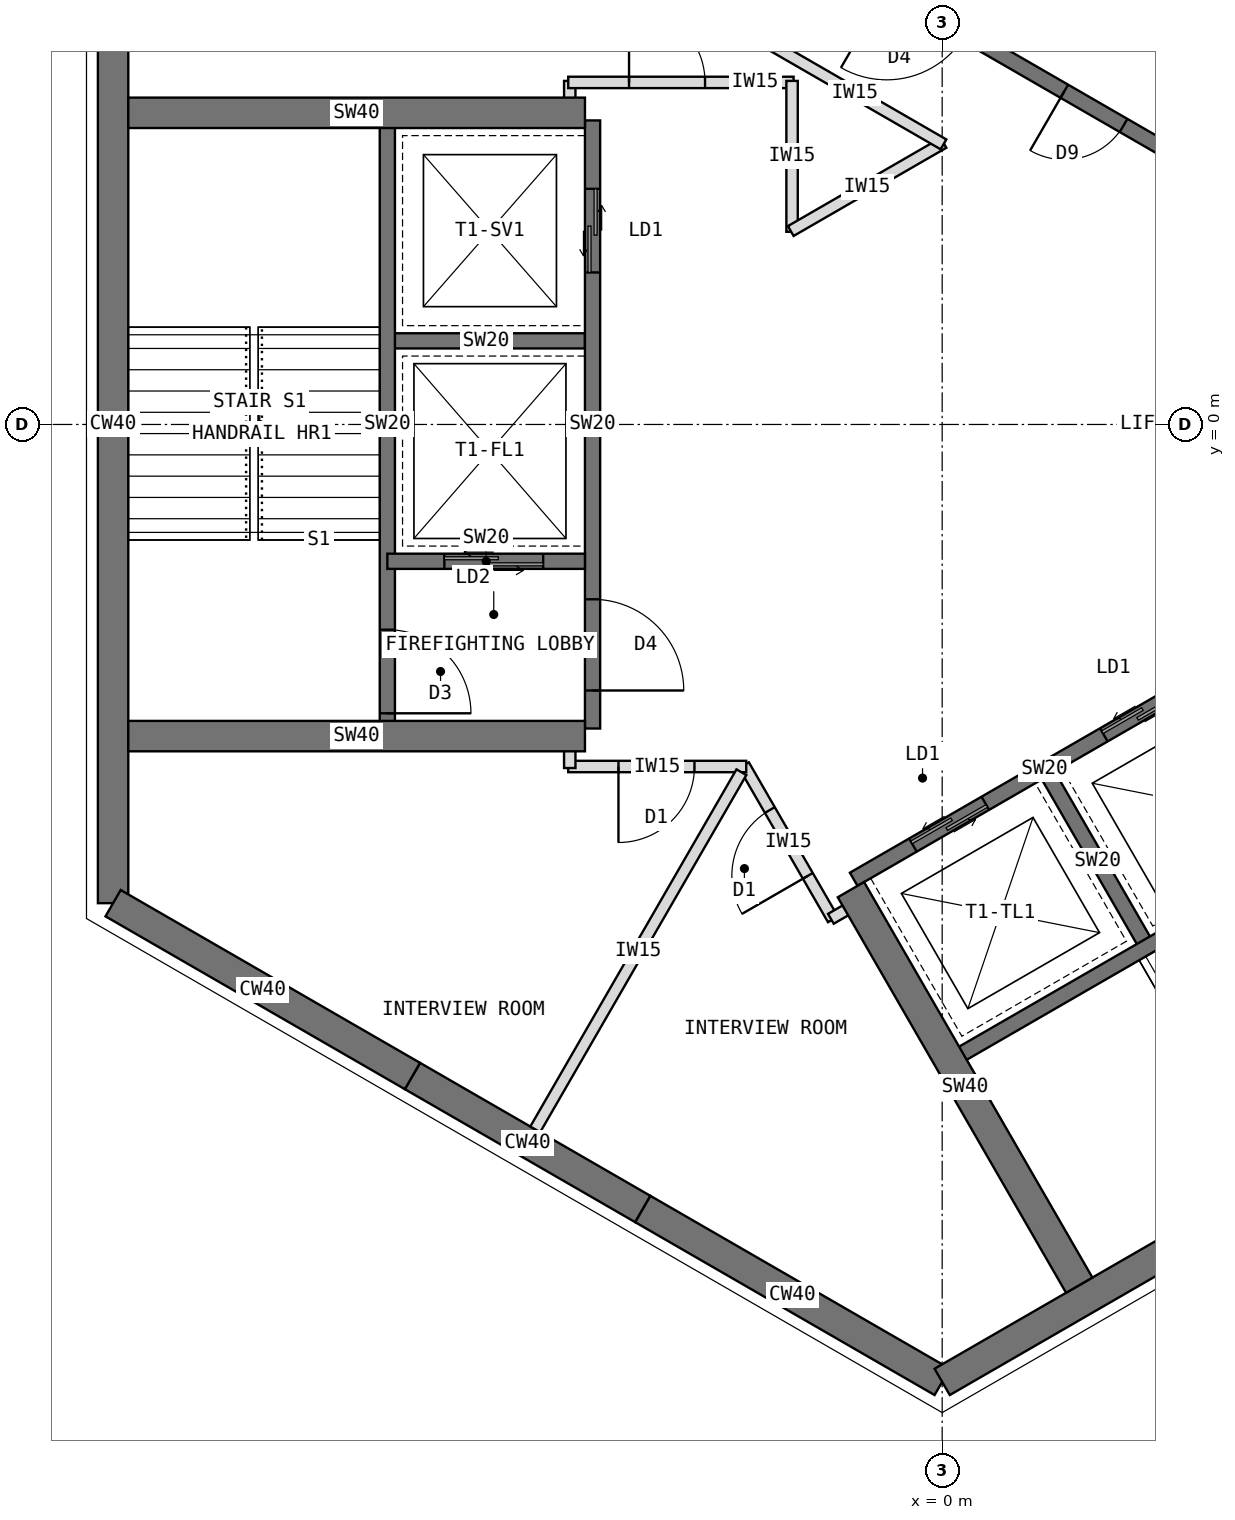
"""IFC4 building model, lengths in metres.
Left out: names, types, materials, properties, quantities, classifications, styles, units other than length and angle.
Written with IfcOpenShell. Run it as: python <this file> out.ifc"""

import sys

from ifc_helpers import new_model, si_unit, direction, frame, frame_2d, origin, place, context, subcontext, project, spatial, rectangle, extrude, element, fill, save


model = new_model("IFC4")
c1 = context("Model", 3, precision=1e-05, world=origin(), true_north=direction((0.0, 1.0)))
c2 = subcontext(c1, "Body", "Model", "MODEL_VIEW")
j1 = project(units=[si_unit("LENGTHUNIT", "METRE"), si_unit("PLANEANGLEUNIT", "RADIAN")], contexts=[c1])
p1 = place(None, origin())
s1 = spatial("IfcSite", under=j1, at=p1, CompositionType="ELEMENT")
p2 = place(p1, origin())
s2 = spatial("IfcBuilding", under=s1, at=p2, CompositionType="ELEMENT")
p3 = place(p2, frame((0.0, 0.0, 287.5)))
s3 = spatial("IfcBuildingStorey", under=s2, at=p3, CompositionType="ELEMENT", Elevation=287.5)
p4 = place(p3, frame((-10.908, 6.298, 0.0), z_axis=(0.0, 0.0, 1.0), x_axis=(0.0, -1.0, 0.0)))
e1 = element("IfcWall", 1, at=p4, inside=s3, PredefinedType="SHEAR", context=c2, shape_type="SweptSolid", body=[
    extrude(rectangle(XDim=12.596, YDim=0.4, at=frame_2d((6.298, 0.0))), origin(), (0.0, 0.0, 1.0), 4.0),
])
p5 = place(p3, frame((-10.908, -6.298, 0.0), z_axis=(0.0, 0.0, 1.0), x_axis=(0.866034513004, -0.499984222037, 0.0)))
e2 = element("IfcWall", 2, at=p5, inside=s3, PredefinedType="SHEAR", context=c2, shape_type="SweptSolid", body=[
    extrude(rectangle(XDim=4.548, YDim=0.4, at=frame_2d((2.274, 0.0))), origin(), (0.0, 0.0, 1.0), 4.0),
])
p6 = place(p3, frame((-6.97, -8.572, 0.0), z_axis=(0.0, 0.0, 1.0), x_axis=(0.866019471182, -0.500010275428, 0.0)))
e3 = element("IfcWall", 3, at=p6, inside=s3, PredefinedType="SHEAR", context=c2, shape_type="SweptSolid", body=[
    extrude(rectangle(XDim=3.5, YDim=0.4, at=frame_2d((1.75, 0.0))), origin(), (0.0, 0.0, 1.0), 4.0),
])
p7 = place(p3, frame((-3.939, -10.322, 0.0), z_axis=(0.0, 0.0, 1.0), x_axis=(0.866011268655, -0.500024481964, 0.0)))
e4 = element("IfcWall", 4, at=p7, inside=s3, PredefinedType="SHEAR", context=c2, shape_type="SweptSolid", body=[
    extrude(rectangle(XDim=4.548, YDim=0.4, at=frame_2d((2.274, 0.0))), origin(), (0.0, 0.0, 1.0), 4.0),
])
p8 = place(p3, frame((0.0, -12.596, 0.0), z_axis=(0.0, 0.0, 1.0), x_axis=(0.866021940709, 0.500005998175, 0.0)))
e5 = element("IfcWall", 5, at=p8, inside=s3, PredefinedType="SHEAR", context=c2, shape_type="SweptSolid", body=[
    extrude(rectangle(XDim=12.596, YDim=0.4, at=frame_2d((6.298, 0.0))), origin(), (0.0, 0.0, 1.0), 4.0),
])
p9 = place(p3, frame((5.764, 1.984, 0.0), z_axis=(0.0, 0.0, 1.0), x_axis=(-0.866026010844, 0.49999894854, 0.0)))
e6 = element("IfcWall", 6, at=p9, inside=s3, PredefinedType="SHEAR", context=c2, shape_type="SweptSolid", body=[
    extrude(rectangle(XDim=8.0, YDim=0.2, at=frame_2d((4.0, 0.0))), origin(), (0.0, 0.0, 1.0), 4.0),
])
p10 = place(p9, frame((6.3, 0.0, 0.0)))
e7 = element("IfcOpeningElement", 7, at=p10, cuts=e6, PredefinedType="OPENING", context=c2, shape_type="SweptSolid", body=[
    extrude(rectangle(XDim=1.2, YDim=2.1, at=frame_2d((0.6, 1.05))), frame((0.0, 0.11, 0.0), z_axis=(0.0, -1.0, 0.0), x_axis=(1.0, 0.0, 0.0)), (0.0, 0.0, 1.0), 0.22),
])
p11 = place(p9, frame((1.0, 0.0, 0.0)))
e8 = element("IfcOpeningElement", 8, at=p11, cuts=e6, PredefinedType="OPENING", context=c2, shape_type="SweptSolid", body=[
    extrude(rectangle(XDim=0.9, YDim=2.1, at=frame_2d((0.45, 1.05))), frame((0.0, 0.11, 0.0), z_axis=(0.0, -1.0, 0.0), x_axis=(1.0, 0.0, 0.0)), (0.0, 0.0, 1.0), 0.22),
])
p12 = place(p9, frame((3.9, 0.0, 0.0)))
e9 = element("IfcOpeningElement", 9, at=p12, cuts=e6, PredefinedType="OPENING", context=c2, shape_type="SweptSolid", body=[
    extrude(rectangle(XDim=0.9, YDim=2.1, at=frame_2d((0.45, 1.05))), frame((0.0, 0.11, 0.0), z_axis=(0.0, -1.0, 0.0), x_axis=(1.0, 0.0, 0.0)), (0.0, 0.0, 1.0), 0.22),
])
p13 = place(p3, frame((7.114, 4.322, 0.0), z_axis=(0.0, 0.0, 1.0), x_axis=(-0.866026010844, 0.49999894854, 0.0)))
e10 = element("IfcWall", 10, at=p13, inside=s3, PredefinedType="SHEAR", context=c2, shape_type="SweptSolid", body=[
    extrude(rectangle(XDim=8.0, YDim=0.2, at=frame_2d((4.0, 0.0))), origin(), (0.0, 0.0, 1.0), 4.0),
])
p14 = place(p13, frame((6.8, 0.0, 0.0)))
e11 = element("IfcOpeningElement", 11, at=p14, cuts=e10, PredefinedType="OPENING", context=c2, shape_type="SweptSolid", body=[
    extrude(rectangle(XDim=0.9, YDim=2.1, at=frame_2d((0.45, 1.05))), frame((0.0, 0.11, 0.0), z_axis=(0.0, -1.0, 0.0), x_axis=(1.0, 0.0, 0.0)), (0.0, 0.0, 1.0), 0.22),
])
p15 = place(p3, frame((-4.6, 4.0, 0.0), z_axis=(0.0, 0.0, 1.0), x_axis=(0.0, -1.0, 0.0)))
e12 = element("IfcWall", 12, at=p15, inside=s3, PredefinedType="SHEAR", context=c2, shape_type="SweptSolid", body=[
    extrude(rectangle(XDim=8.0, YDim=0.2, at=frame_2d((4.0, 0.0))), origin(), (0.0, 0.0, 1.0), 4.0),
])
p16 = place(p15, frame((6.3, 0.0, 0.0)))
e13 = element("IfcOpeningElement", 13, at=p16, cuts=e12, PredefinedType="OPENING", context=c2, shape_type="SweptSolid", body=[
    extrude(rectangle(XDim=1.2, YDim=2.1, at=frame_2d((0.6, 1.05))), frame((0.0, 0.11, 0.0), z_axis=(0.0, -1.0, 0.0), x_axis=(1.0, 0.0, 0.0)), (0.0, 0.0, 1.0), 0.22),
])
p17 = place(p15, frame((0.9, 0.0, 0.0)))
e14 = element("IfcOpeningElement", 14, at=p17, cuts=e12, PredefinedType="OPENING", context=c2, shape_type="SweptSolid", body=[
    extrude(rectangle(XDim=1.1, YDim=2.2, at=frame_2d((0.55, 1.1))), frame((0.0, 0.11, 0.0), z_axis=(0.0, -1.0, 0.0), x_axis=(1.0, 0.0, 0.0)), (0.0, 0.0, 1.0), 0.22),
])
p18 = place(p3, frame((-4.7, 1.1, 0.0), z_axis=(0.0, 0.0, 1.0), x_axis=(-1.0, 0.0, 0.0)))
e15 = element("IfcWall", 15, at=p18, inside=s3, PredefinedType="SHEAR", context=c2, shape_type="SweptSolid", body=[
    extrude(rectangle(XDim=2.6, YDim=0.2, at=frame_2d((1.3, 0.0))), origin(), (0.0, 0.0, 1.0), 4.0),
])
p19 = place(p3, frame((-4.7, -1.8, 0.0), z_axis=(0.0, 0.0, 1.0), x_axis=(-1.0, 0.0, 0.0)))
e16 = element("IfcWall", 16, at=p19, inside=s3, PredefinedType="SHEAR", context=c2, shape_type="SweptSolid", body=[
    extrude(rectangle(XDim=2.6, YDim=0.2, at=frame_2d((1.3, 0.0))), origin(), (0.0, 0.0, 1.0), 4.0),
])
p20 = place(p19, frame((0.55, 0.0, 0.0)))
e17 = element("IfcOpeningElement", 17, at=p20, cuts=e16, PredefinedType="OPENING", context=c2, shape_type="SweptSolid", body=[
    extrude(rectangle(XDim=1.3, YDim=2.2, at=frame_2d((0.65, 1.1))), frame((0.0, 0.11, 0.0), z_axis=(0.0, -1.0, 0.0), x_axis=(1.0, 0.0, 0.0)), (0.0, 0.0, 1.0), 0.22),
])
p21 = place(p3, frame((-7.3, 4.0, 0.0), z_axis=(0.0, 0.0, 1.0), x_axis=(0.0, -1.0, 0.0)))
e18 = element("IfcWall", 18, at=p21, inside=s3, PredefinedType="SHEAR", context=c2, shape_type="SweptSolid", body=[
    extrude(rectangle(XDim=8.0, YDim=0.2, at=frame_2d((4.0, 0.0))), origin(), (0.0, 0.0, 1.0), 4.0),
])
p22 = place(p21, frame((6.7, 0.0, 0.0)))
e19 = element("IfcOpeningElement", 19, at=p22, cuts=e18, PredefinedType="OPENING", context=c2, shape_type="SweptSolid", body=[
    extrude(rectangle(XDim=1.1, YDim=2.1, at=frame_2d((0.55, 1.05))), frame((0.0, 0.11, 0.0), z_axis=(0.0, -1.0, 0.0), x_axis=(1.0, 0.0, 0.0)), (0.0, 0.0, 1.0), 0.22),
])
for number, where, z_axis, x_axis in (
    (20, (-4.7, -4.1, 0.0), (0.0, 0.0, 1.0), (-1.0, 0.0, 0.0)),
    (21, (-4.7, 4.1, 0.0), (0.0, 0.0, 1.0), (-1.0, 0.0, 0.0)),
):
    element("IfcWall", number, at=place(p3, frame(where, z_axis=z_axis, x_axis=x_axis)), inside=s3, PredefinedType="SHEAR", context=c2, shape_type="SweptSolid", body=[
        extrude(rectangle(XDim=6.008, YDim=0.4, at=frame_2d((3.004, 0.0))), origin(), (0.0, 0.0, 1.0), 4.0),
    ])
p23 = place(p3, frame((-1.164, -5.984, 0.0), z_axis=(0.0, 0.0, 1.0), x_axis=(0.866026010844, 0.49999894854, 0.0)))
e22 = element("IfcWall", 22, at=p23, inside=s3, PredefinedType="SHEAR", context=c2, shape_type="SweptSolid", body=[
    extrude(rectangle(XDim=8.0, YDim=0.2, at=frame_2d((4.0, 0.0))), origin(), (0.0, 0.0, 1.0), 4.0),
])
p24 = place(p23, frame((6.3, 0.0, 0.0)))
e23 = element("IfcOpeningElement", 23, at=p24, cuts=e22, PredefinedType="OPENING", context=c2, shape_type="SweptSolid", body=[
    extrude(rectangle(XDim=1.2, YDim=2.1, at=frame_2d((0.6, 1.05))), frame((0.0, 0.11, 0.0), z_axis=(0.0, -1.0, 0.0), x_axis=(1.0, 0.0, 0.0)), (0.0, 0.0, 1.0), 0.22),
])
p25 = place(p23, frame((0.9, 0.0, 0.0)))
e24 = element("IfcOpeningElement", 24, at=p25, cuts=e22, PredefinedType="OPENING", context=c2, shape_type="SweptSolid", body=[
    extrude(rectangle(XDim=1.1, YDim=2.2, at=frame_2d((0.55, 1.1))), frame((0.0, 0.11, 0.0), z_axis=(0.0, -1.0, 0.0), x_axis=(1.0, 0.0, 0.0)), (0.0, 0.0, 1.0), 0.22),
])
p26 = place(p23, frame((3.8, 0.0, 0.0)))
e25 = element("IfcOpeningElement", 25, at=p26, cuts=e22, PredefinedType="OPENING", context=c2, shape_type="SweptSolid", body=[
    extrude(rectangle(XDim=1.1, YDim=2.2, at=frame_2d((0.55, 1.1))), frame((0.0, 0.11, 0.0), z_axis=(0.0, -1.0, 0.0), x_axis=(1.0, 0.0, 0.0)), (0.0, 0.0, 1.0), 0.22),
])
p27 = place(p3, frame((1.397, -4.62, 0.0), z_axis=(0.0, 0.0, 1.0), x_axis=(0.499936506574, -0.866062058628, 0.0)))
e26 = element("IfcWall", 26, at=p27, inside=s3, PredefinedType="SHEAR", context=c2, shape_type="SweptSolid", body=[
    extrude(rectangle(XDim=2.6, YDim=0.2, at=frame_2d((1.3, 0.0))), origin(), (0.0, 0.0, 1.0), 4.0),
])
p28 = place(p3, frame((0.186, -8.322, 0.0), z_axis=(0.0, 0.0, 1.0), x_axis=(0.866026010844, 0.49999894854, 0.0)))
e27 = element("IfcWall", 27, at=p28, inside=s3, PredefinedType="SHEAR", context=c2, shape_type="SweptSolid", body=[
    extrude(rectangle(XDim=8.0, YDim=0.2, at=frame_2d((4.0, 0.0))), origin(), (0.0, 0.0, 1.0), 4.0),
])
p29 = place(p28, frame((6.7, 0.0, 0.0)))
e28 = element("IfcOpeningElement", 28, at=p29, cuts=e27, PredefinedType="OPENING", context=c2, shape_type="SweptSolid", body=[
    extrude(rectangle(XDim=1.1, YDim=2.1, at=frame_2d((0.55, 1.05))), frame((0.0, 0.11, 0.0), z_axis=(0.0, -1.0, 0.0), x_axis=(1.0, 0.0, 0.0)), (0.0, 0.0, 1.0), 0.22),
])
p30 = place(p3, frame((-1.201, -6.12, 0.0), z_axis=(0.0, 0.0, 1.0), x_axis=(0.499997979876, -0.866026570101, 0.0)))
e29 = element("IfcWall", 29, at=p30, inside=s3, PredefinedType="SHEAR", context=c2, shape_type="SweptSolid", body=[
    extrude(rectangle(XDim=6.008, YDim=0.4, at=frame_2d((3.004, 0.0))), origin(), (0.0, 0.0, 1.0), 4.0),
])
p31 = place(p3, frame((-1.437, -6.511, 0.0), z_axis=(0.0, 0.0, 1.0), x_axis=(-0.500074377092, 0.865982457891, 0.0)))
e30 = element("IfcWall", 30, at=p31, inside=s3, PredefinedType="PARTITIONING", context=c2, shape_type="SweptSolid", body=[
    extrude(rectangle(XDim=2.342, YDim=0.15, at=frame_2d((1.171, 0.0))), origin(), (0.0, 0.0, 1.0), 3.7),
])
p32 = place(p31, frame((0.661, 0.0, 0.0)))
e31 = element("IfcOpeningElement", 31, at=p32, cuts=e30, PredefinedType="OPENING", context=c2, shape_type="SweptSolid", body=[
    extrude(rectangle(XDim=1.0, YDim=2.1, at=frame_2d((0.5, 1.05))), frame((0.0, 0.085, 0.0), z_axis=(0.0, -1.0, 0.0), x_axis=(1.0, 0.0, 0.0)), (0.0, 0.0, 1.0), 0.17),
])
p33 = place(p3, frame((-2.578, -4.5, 0.0), z_axis=(0.0, 0.0, 1.0), x_axis=(-1.0, 0.0, 0.0)))
e32 = element("IfcWall", 32, at=p33, inside=s3, PredefinedType="PARTITIONING", context=c2, shape_type="SweptSolid", body=[
    extrude(rectangle(XDim=2.342, YDim=0.15, at=frame_2d((1.171, 0.0))), origin(), (0.0, 0.0, 1.0), 3.7),
])
p34 = place(p33, frame((0.681, 0.0, 0.0)))
e33 = element("IfcOpeningElement", 33, at=p34, cuts=e32, PredefinedType="OPENING", context=c2, shape_type="SweptSolid", body=[
    extrude(rectangle(XDim=1.0, YDim=2.1, at=frame_2d((0.5, 1.05))), frame((0.0, 0.085, 0.0), z_axis=(0.0, -1.0, 0.0), x_axis=(1.0, 0.0, 0.0)), (0.0, 0.0, 1.0), 0.17),
])
for number, where, z_axis, x_axis in (
    (34, (-4.9, -4.52, 0.0), (0.0, 0.0, 1.0), (0.0, 1.0, 0.0)),
    (35, (-4.9, 4.09, 0.0), (0.0, 0.0, 1.0), (0.0, 1.0, 0.0)),
):
    element("IfcWall", number, at=place(p3, frame(where, z_axis=z_axis, x_axis=x_axis)), inside=s3, PredefinedType="PARTITIONING", context=c2, shape_type="SweptSolid", body=[
        extrude(rectangle(XDim=0.43, YDim=0.15, at=frame_2d((0.215, 0.0))), origin(), (0.0, 0.0, 1.0), 3.7),
    ])
p35 = place(p3, frame((-4.92, 4.5, 0.0), z_axis=(0.0, 0.0, 1.0), x_axis=(1.0, 0.0, 0.0)))
e36 = element("IfcWall", 36, at=p35, inside=s3, PredefinedType="PARTITIONING", context=c2, shape_type="SweptSolid", body=[
    extrude(rectangle(XDim=2.965, YDim=0.15, at=frame_2d((1.482, 0.0))), origin(), (0.0, 0.0, 1.0), 3.7),
])
p36 = place(p35, frame((0.8, 0.0, 0.0)))
e37 = element("IfcOpeningElement", 37, at=p36, cuts=e36, PredefinedType="OPENING", context=c2, shape_type="SweptSolid", body=[
    extrude(rectangle(XDim=1.0, YDim=2.1, at=frame_2d((0.5, 1.05))), frame((0.0, 0.085, 0.0), z_axis=(0.0, -1.0, 0.0), x_axis=(1.0, 0.0, 0.0)), (0.0, 0.0, 1.0), 0.17),
])
p37 = place(p3, frame((-1.975, 4.52, 0.0), z_axis=(0.0, 0.0, 1.0), x_axis=(0.0, -1.0, 0.0)))
e38 = element("IfcWall", 38, at=p37, inside=s3, PredefinedType="PARTITIONING", context=c2, shape_type="SweptSolid", body=[
    extrude(rectangle(XDim=1.985, YDim=0.15, at=frame_2d((0.993, 0.0))), origin(), (0.0, 0.0, 1.0), 3.7),
])
p38 = place(p3, frame((-1.992, 2.545, 0.0), z_axis=(0.0, 0.0, 1.0), x_axis=(0.866059450854, 0.499941024108, 0.0)))
e39 = element("IfcWall", 39, at=p38, inside=s3, PredefinedType="PARTITIONING", context=c2, shape_type="SweptSolid", body=[
    extrude(rectangle(XDim=2.321, YDim=0.15, at=frame_2d((1.16, 0.0))), origin(), (0.0, 0.0, 1.0), 3.7),
])
p39 = place(p3, frame((0.017, 3.685, 0.0), z_axis=(0.0, 0.0, 1.0), x_axis=(-0.866036099759, 0.499981473571, 0.0)))
e40 = element("IfcWall", 40, at=p39, inside=s3, PredefinedType="PARTITIONING", context=c2, shape_type="SweptSolid", body=[
    extrude(rectangle(XDim=2.692, YDim=0.15, at=frame_2d((1.346, 0.0))), origin(), (0.0, 0.0, 1.0), 3.7),
])
p40 = place(p3, frame((-1.092, -6.289, 0.0), z_axis=(0.0, 0.0, 1.0), x_axis=(-0.866138304741, -0.499804398801, 0.0)))
e41 = element("IfcWall", 41, at=p40, inside=s3, PredefinedType="PARTITIONING", context=c2, shape_type="SweptSolid", body=[
    extrude(rectangle(XDim=0.43, YDim=0.15, at=frame_2d((0.215, 0.0))), origin(), (0.0, 0.0, 1.0), 3.7),
])
p41 = place(p3, frame((-2.641, -4.575, 0.0), z_axis=(0.0, 0.0, 1.0), x_axis=(-0.500010688608, -0.866019232626, 0.0)))
e42 = element("IfcWall", 42, at=p41, inside=s3, PredefinedType="PARTITIONING", context=c2, shape_type="SweptSolid", body=[
    extrude(rectangle(XDim=5.426, YDim=0.15, at=frame_2d((2.713, 0.0))), origin(), (0.0, 0.0, 1.0), 3.7),
])
p42 = place(p16, origin())
e43 = element("IfcDoor", 43, at=p42, inside=s3, OperationType="SINGLE_SWING_RIGHT", PredefinedType="DOOR", context=c2, shape_type="SweptSolid", body=[
    extrude(rectangle(XDim=1.2, YDim=2.1, at=frame_2d((0.6, 1.05))), frame((0.0, 0.025, 0.0), z_axis=(0.0, -1.0, 0.0), x_axis=(1.0, 0.0, 0.0)), (0.0, 0.0, 1.0), 0.05),
])
fill(e13, e43)
p43 = place(p20, origin())
e44 = element("IfcDoor", 44, at=p43, inside=s3, OperationType="DOUBLE_DOOR_SLIDING", PredefinedType="DOOR", context=c2, shape_type="SweptSolid", body=[
    extrude(rectangle(XDim=1.3, YDim=2.2, at=frame_2d((0.65, 1.1))), frame((0.0, 0.025, 0.0), z_axis=(0.0, -1.0, 0.0), x_axis=(1.0, 0.0, 0.0)), (0.0, 0.0, 1.0), 0.05),
])
fill(e17, e44)
p44 = place(p17, origin())
e45 = element("IfcDoor", 45, at=p44, inside=s3, OperationType="DOUBLE_DOOR_SLIDING", PredefinedType="DOOR", context=c2, shape_type="SweptSolid", body=[
    extrude(rectangle(XDim=1.1, YDim=2.2, at=frame_2d((0.55, 1.1))), frame((0.0, 0.025, 0.0), z_axis=(0.0, -1.0, 0.0), x_axis=(1.0, 0.0, 0.0)), (0.0, 0.0, 1.0), 0.05),
])
fill(e14, e45)
p45 = place(p22, origin())
e46 = element("IfcDoor", 46, at=p45, inside=s3, OperationType="SINGLE_SWING_RIGHT", PredefinedType="DOOR", context=c2, shape_type="SweptSolid", body=[
    extrude(rectangle(XDim=1.1, YDim=2.1, at=frame_2d((0.55, 1.05))), frame((0.0, 0.025, 0.0), z_axis=(0.0, -1.0, 0.0), x_axis=(1.0, 0.0, 0.0)), (0.0, 0.0, 1.0), 0.05),
])
fill(e19, e46)
p46 = place(p25, origin())
e47 = element("IfcDoor", 47, at=p46, inside=s3, OperationType="DOUBLE_DOOR_SLIDING", PredefinedType="DOOR", context=c2, shape_type="SweptSolid", body=[
    extrude(rectangle(XDim=1.1, YDim=2.2, at=frame_2d((0.55, 1.1))), frame((0.0, 0.025, 0.0), z_axis=(0.0, -1.0, 0.0), x_axis=(1.0, 0.0, 0.0)), (0.0, 0.0, 1.0), 0.05),
])
fill(e24, e47)
p47 = place(p26, origin())
e48 = element("IfcDoor", 48, at=p47, inside=s3, OperationType="DOUBLE_DOOR_SLIDING", PredefinedType="DOOR", context=c2, shape_type="SweptSolid", body=[
    extrude(rectangle(XDim=1.1, YDim=2.2, at=frame_2d((0.55, 1.1))), frame((0.0, 0.025, 0.0), z_axis=(0.0, -1.0, 0.0), x_axis=(1.0, 0.0, 0.0)), (0.0, 0.0, 1.0), 0.05),
])
fill(e25, e48)
p48 = place(p34, origin())
e49 = element("IfcDoor", 49, at=p48, inside=s3, OperationType="SINGLE_SWING_RIGHT", PredefinedType="DOOR", context=c2, shape_type="SweptSolid", body=[
    extrude(rectangle(XDim=1.0, YDim=2.1, at=frame_2d((0.5, 1.05))), frame((0.0, 0.025, 0.0), z_axis=(0.0, -1.0, 0.0), x_axis=(1.0, 0.0, 0.0)), (0.0, 0.0, 1.0), 0.05),
])
fill(e33, e49)
p49 = place(p32, origin())
e50 = element("IfcDoor", 50, at=p49, inside=s3, OperationType="SINGLE_SWING_LEFT", PredefinedType="DOOR", context=c2, shape_type="SweptSolid", body=[
    extrude(rectangle(XDim=1.0, YDim=2.1, at=frame_2d((0.5, 1.05))), frame((0.0, 0.025, 0.0), z_axis=(0.0, -1.0, 0.0), x_axis=(1.0, 0.0, 0.0)), (0.0, 0.0, 1.0), 0.05),
])
fill(e31, e50)
p50 = place(p36, origin())
e51 = element("IfcDoor", 51, at=p50, inside=s3, OperationType="SINGLE_SWING_LEFT", PredefinedType="DOOR", context=c2, shape_type="SweptSolid", body=[
    extrude(rectangle(XDim=1.0, YDim=2.1, at=frame_2d((0.5, 1.05))), frame((0.0, 0.025, 0.0), z_axis=(0.0, -1.0, 0.0), x_axis=(1.0, 0.0, 0.0)), (0.0, 0.0, 1.0), 0.05),
])
fill(e37, e51)
p51 = place(p12, origin())
e52 = element("IfcDoor", 52, at=p51, inside=s3, OperationType="SINGLE_SWING_RIGHT", PredefinedType="DOOR", context=c2, shape_type="SweptSolid", body=[
    extrude(rectangle(XDim=0.9, YDim=2.1, at=frame_2d((0.45, 1.05))), frame((0.0, 0.025, 0.0), z_axis=(0.0, -1.0, 0.0), x_axis=(1.0, 0.0, 0.0)), (0.0, 0.0, 1.0), 0.05),
])
fill(e9, e52)
save(model, sys.argv[1])
